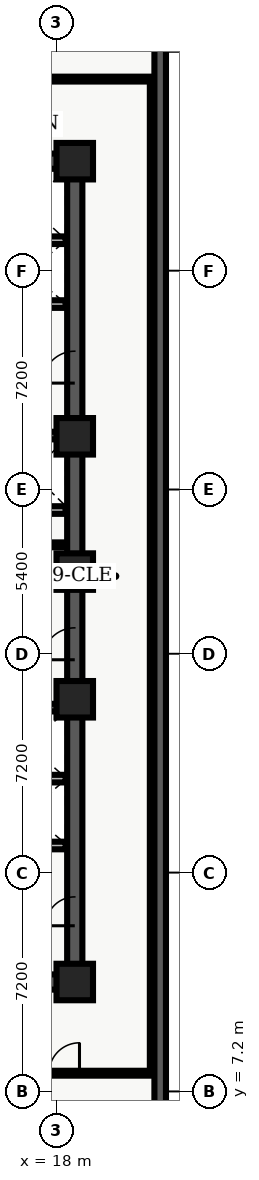
"""IFC4 building model, lengths in metres.
Left out: names, types, materials, properties, quantities, classifications, styles, units other than length and angle.
Written with IfcOpenShell. Run it as: python <this file> out.ifc"""

import sys

from ifc_helpers import new_model, entity, si_unit, converted_unit, direction, frame, origin_with_axes, origin_2d_with_axis, place, context, subcontext, project, spatial, polyline, rectangle, outline, extrude, element, fill, save


model = new_model("IFC4")
c1 = context("Model", 3, precision=1e-05, world=origin_with_axes(), true_north=direction((0.0, 1.0)))
c2 = subcontext(c1, "Body", "Model", "MODEL_VIEW")
j1 = project(units=[si_unit("LENGTHUNIT", "METRE"), converted_unit("PLANEANGLEUNIT", "DEGREE", entity("IfcPlaneAngleMeasure", 0.017), si_unit("PLANEANGLEUNIT", "RADIAN"), dimensions=[0, 0, 0, 0, 0, 0, 0])], contexts=[c1])
p1 = place(None, origin_with_axes())
s1 = spatial("IfcSite", under=j1, at=p1, CompositionType="ELEMENT")
p2 = place(p1, origin_with_axes())
s2 = spatial("IfcBuilding", under=s1, at=p2, CompositionType="ELEMENT")
p3 = place(p2, frame((0.0, 0.0, 120.3), z_axis=(0.0, 0.0, 1.0), x_axis=(1.0, 0.0, 0.0)))
s3 = spatial("IfcBuildingStorey", under=s2, at=p3, CompositionType="ELEMENT", Elevation=120.3)
p4 = place(p3, frame((11.4, 10.8, 0.0), z_axis=(0.0, 0.0, 1.0), x_axis=(1.0, 0.0, 0.0)))
e1 = element("IfcWall", 1, at=p4, inside=s3, PredefinedType="SHEAR", context=c2, shape_type="SweptSolid", body=[
    extrude(outline(polyline([(0.0, -0.25), (7.2, -0.25), (7.2, 0.25), (0.0, 0.25), (0.0, -0.25)])), origin_with_axes(), (0.0, 0.0, 1.0), 3.6),
])
p5 = place(p4, frame((2.625, 0.0, 0.0), z_axis=(0.0, 0.0, 1.0), x_axis=(1.0, 0.0, 0.0)))
e2 = element("IfcOpeningElement", 2, at=p5, cuts=e1, PredefinedType="OPENING", context=c2, shape_type="SweptSolid", body=[
    extrude(rectangle(XDim=1.05, YDim=0.52, at=origin_2d_with_axis()), origin_with_axes(), (0.0, 0.0, 1.0), 2.15),
])
p6 = place(p3, frame((11.4, 37.8, 0.0), z_axis=(0.0, 0.0, 1.0), x_axis=(1.0, 0.0, 0.0)))
e3 = element("IfcWall", 3, at=p6, inside=s3, PredefinedType="SHEAR", context=c2, shape_type="SweptSolid", body=[
    extrude(outline(polyline([(0.0, -0.25), (7.2, -0.25), (7.2, 0.25), (0.0, 0.25), (0.0, -0.25)])), origin_with_axes(), (0.0, 0.0, 1.0), 3.6),
])
p7 = place(p6, frame((2.625, 0.0, 0.0), z_axis=(0.0, 0.0, 1.0), x_axis=(1.0, 0.0, 0.0)))
e4 = element("IfcOpeningElement", 4, at=p7, cuts=e3, PredefinedType="OPENING", context=c2, shape_type="SweptSolid", body=[
    extrude(rectangle(XDim=1.05, YDim=0.52, at=origin_2d_with_axis()), origin_with_axes(), (0.0, 0.0, 1.0), 2.15),
])
p8 = place(p3, frame((18.6, 10.8, 0.0), z_axis=(0.0, 0.0, 1.0), x_axis=(0.0, 1.0, 0.0)))
e5 = element("IfcWall", 5, at=p8, inside=s3, PredefinedType="SHEAR", context=c2, shape_type="SweptSolid", body=[
    extrude(outline(polyline([(0.0, -0.25), (13.5, -0.25), (13.5, 0.25), (0.0, 0.25), (0.0, -0.25)])), origin_with_axes(), (0.0, 0.0, 1.0), 3.6),
])
p9 = place(p8, frame((11.125, 0.0, 0.0), z_axis=(0.0, 0.0, 1.0), x_axis=(1.0, 0.0, 0.0)))
e6 = element("IfcOpeningElement", 6, at=p9, cuts=e5, PredefinedType="OPENING", context=c2, shape_type="SweptSolid", body=[
    extrude(rectangle(XDim=1.05, YDim=0.52, at=origin_2d_with_axis()), origin_with_axes(), (0.0, 0.0, 1.0), 2.15),
])
p10 = place(p8, frame((2.325, 0.0, 0.0), z_axis=(0.0, 0.0, 1.0), x_axis=(1.0, 0.0, 0.0)))
e7 = element("IfcOpeningElement", 7, at=p10, cuts=e5, PredefinedType="OPENING", context=c2, shape_type="SweptSolid", body=[
    extrude(rectangle(XDim=0.95, YDim=0.52, at=origin_2d_with_axis()), origin_with_axes(), (0.0, 0.0, 1.0), 2.15),
])
p11 = place(p3, frame((18.6, 24.3, 0.0), z_axis=(0.0, 0.0, 1.0), x_axis=(0.0, 1.0, 0.0)))
e8 = element("IfcWall", 8, at=p11, inside=s3, PredefinedType="SHEAR", context=c2, shape_type="SweptSolid", body=[
    extrude(outline(polyline([(0.0, -0.25), (13.5, -0.25), (13.5, 0.25), (0.0, 0.25), (0.0, -0.25)])), origin_with_axes(), (0.0, 0.0, 1.0), 3.6),
])
p12 = place(p11, frame((6.725, 0.0, 0.0), z_axis=(0.0, 0.0, 1.0), x_axis=(1.0, 0.0, 0.0)))
e9 = element("IfcOpeningElement", 9, at=p12, cuts=e8, PredefinedType="OPENING", context=c2, shape_type="SweptSolid", body=[
    extrude(rectangle(XDim=1.05, YDim=0.52, at=origin_2d_with_axis()), origin_with_axes(), (0.0, 0.0, 1.0), 2.15),
])
for number, where, z_axis, x_axis in (
    (10, (11.65, 19.825, 0.0), (0.0, 0.0, 1.0), (1.0, 0.0, 0.0)),
    (11, (11.65, 28.775, 0.0), (0.0, 0.0, 1.0), (1.0, 0.0, 0.0)),
):
    element("IfcWall", number, at=place(p3, frame(where, z_axis=z_axis, x_axis=x_axis)), inside=s3, PredefinedType="SHEAR", context=c2, shape_type="SweptSolid", body=[
        extrude(outline(polyline([(0.0, -0.125), (6.7, -0.125), (6.7, 0.125), (0.0, 0.125), (0.0, -0.125)])), origin_with_axes(), (0.0, 0.0, 1.0), 3.6),
    ])
p13 = place(p3, frame((11.7, 24.1, 0.0), z_axis=(0.0, 0.0, 1.0), x_axis=(1.0, 0.0, 0.0)))
e12 = element("IfcWall", 12, at=p13, inside=s3, PredefinedType="SOLIDWALL", context=c2, shape_type="SweptSolid", body=[
    extrude(outline(polyline([(0.0, -0.125), (6.6, -0.125), (6.6, 0.125), (0.0, 0.125), (0.0, -0.125)])), origin_with_axes(), (0.0, 0.0, 1.0), 2.64),
])
p14 = place(p13, frame((3.75, 0.0, 0.0), z_axis=(0.0, 0.0, 1.0), x_axis=(1.0, 0.0, 0.0)))
e13 = element("IfcOpeningElement", 13, at=p14, cuts=e12, PredefinedType="OPENING", context=c2, shape_type="SweptSolid", body=[
    extrude(rectangle(XDim=0.9, YDim=0.27, at=origin_2d_with_axis()), origin_with_axes(), (0.0, 0.0, 1.0), 2.15),
])
p15 = place(p3, frame((11.7, 26.325, 0.0), z_axis=(0.0, 0.0, 1.0), x_axis=(1.0, 0.0, 0.0)))
e14 = element("IfcWall", 14, at=p15, inside=s3, PredefinedType="SOLIDWALL", context=c2, shape_type="SweptSolid", body=[
    extrude(outline(polyline([(0.0, -0.125), (6.6, -0.125), (6.6, 0.125), (0.0, 0.125), (0.0, -0.125)])), origin_with_axes(), (0.0, 0.0, 1.0), 2.64),
])
p16 = place(p15, frame((3.5, 0.0, 0.0), z_axis=(0.0, 0.0, 1.0), x_axis=(1.0, 0.0, 0.0)))
e15 = element("IfcOpeningElement", 15, at=p16, cuts=e14, PredefinedType="OPENING", context=c2, shape_type="SweptSolid", body=[
    extrude(rectangle(XDim=0.9, YDim=0.27, at=origin_2d_with_axis()), origin_with_axes(), (0.0, 0.0, 1.0), 2.15),
])
for number, where, z_axis, x_axis in (
    (16, (18.6, 10.8, 0.0), (0.0, 0.0, 1.0), (1.0, 0.0, 0.0)),
    (17, (18.6, 20.1, 0.0), (0.0, 0.0, 1.0), (1.0, 0.0, 0.0)),
    (18, (18.6, 24.3, 0.0), (0.0, 0.0, 1.0), (1.0, 0.0, 0.0)),
    (19, (18.6, 28.75, 0.0), (0.0, 0.0, 1.0), (1.0, 0.0, 0.0)),
    (20, (18.6, 37.8, 0.0), (0.0, 0.0, 1.0), (1.0, 0.0, 0.0)),
):
    element("IfcColumn", number, at=place(p3, frame(where, z_axis=z_axis, x_axis=x_axis)), inside=s3, PredefinedType="COLUMN", context=c2, shape_type="SweptSolid", body=[
        extrude(rectangle(XDim=1.2, YDim=1.2, at=origin_2d_with_axis()), origin_with_axes(), (0.0, 0.0, 1.0), 3.9),
    ])
p17 = place(p3, frame((14.62, 25.18, 0.0), z_axis=(0.0, 0.0, 1.0), x_axis=(1.0, 0.0, 0.0)))
e21 = element("IfcWall", 21, at=p17, inside=s3, PredefinedType="PARTITIONING", context=c2, shape_type="SweptSolid", body=[
    extrude(outline(polyline([(0.0, -0.08), (3.68, -0.08), (3.68, 0.08), (0.0, 0.08), (0.0, -0.08)])), origin_with_axes(), (0.0, 0.0, 1.0), 2.64),
])
p18 = place(p17, frame((1.95, 0.0, 0.0), z_axis=(0.0, 0.0, 1.0), x_axis=(1.0, 0.0, 0.0)))
e22 = element("IfcOpeningElement", 22, at=p18, cuts=e21, PredefinedType="OPENING", context=c2, shape_type="SweptSolid", body=[
    extrude(rectangle(XDim=0.9, YDim=0.18, at=origin_2d_with_axis()), origin_with_axes(), (0.0, 0.0, 1.0), 2.15),
])
for number, where, z_axis, x_axis in (
    (23, (15.84, 15.29, 0.0), (0.0, 0.0, 1.0), (1.0, 0.0, 0.0)),
    (24, (15.84, 17.49, 0.0), (0.0, 0.0, 1.0), (1.0, 0.0, 0.0)),
    (25, (15.84, 33.1, 0.0), (0.0, 0.0, 1.0), (1.0, 0.0, 0.0)),
    (26, (15.84, 35.2, 0.0), (0.0, 0.0, 1.0), (1.0, 0.0, 0.0)),
):
    element("IfcWall", number, at=place(p3, frame(where, z_axis=z_axis, x_axis=x_axis)), inside=s3, PredefinedType="SOLIDWALL", context=c2, shape_type="SweptSolid", body=[
        extrude(outline(polyline([(0.0, -0.125), (2.46, -0.125), (2.46, 0.125), (0.0, 0.125), (0.0, -0.125)])), origin_with_axes(), (0.0, 0.0, 1.0), 2.64),
    ])
p19 = place(p3, frame((2.6, 7.8, 0.0), z_axis=(0.0, 0.0, 1.0), x_axis=(1.0, 0.0, 0.0)))
e27 = element("IfcWall", 27, at=p19, inside=s3, PredefinedType="PARTITIONING", context=c2, shape_type="SweptSolid", body=[
    extrude(outline(polyline([(0.0, -0.08), (18.625, -0.08), (18.625, 0.08), (0.0, 0.08), (0.0, -0.08)])), origin_with_axes(), (0.0, 0.0, 1.0), 2.64),
])
p20 = place(p19, frame((1.86, 0.0, 0.0), z_axis=(0.0, 0.0, 1.0), x_axis=(1.0, 0.0, 0.0)))
e28 = element("IfcOpeningElement", 28, at=p20, cuts=e27, PredefinedType="OPENING", context=c2, shape_type="SweptSolid", body=[
    extrude(rectangle(XDim=1.0, YDim=0.18, at=origin_2d_with_axis()), origin_with_axes(), (0.0, 0.0, 1.0), 2.15),
])
p21 = place(p19, frame((6.825, 0.0, 0.0), z_axis=(0.0, 0.0, 1.0), x_axis=(1.0, 0.0, 0.0)))
e29 = element("IfcOpeningElement", 29, at=p21, cuts=e27, PredefinedType="OPENING", context=c2, shape_type="SweptSolid", body=[
    extrude(rectangle(XDim=1.0, YDim=0.18, at=origin_2d_with_axis()), origin_with_axes(), (0.0, 0.0, 1.0), 2.15),
])
p22 = place(p19, frame((10.806, 0.0, 0.0), z_axis=(0.0, 0.0, 1.0), x_axis=(1.0, 0.0, 0.0)))
e30 = element("IfcOpeningElement", 30, at=p22, cuts=e27, PredefinedType="OPENING", context=c2, shape_type="SweptSolid", body=[
    extrude(rectangle(XDim=1.0, YDim=0.18, at=origin_2d_with_axis()), origin_with_axes(), (0.0, 0.0, 1.0), 2.15),
])
p23 = place(p19, frame((15.655, 0.0, 0.0), z_axis=(0.0, 0.0, 1.0), x_axis=(1.0, 0.0, 0.0)))
e31 = element("IfcOpeningElement", 31, at=p23, cuts=e27, PredefinedType="OPENING", context=c2, shape_type="SweptSolid", body=[
    extrude(rectangle(XDim=1.0, YDim=0.18, at=origin_2d_with_axis()), origin_with_axes(), (0.0, 0.0, 1.0), 2.15),
])
p24 = place(p3, frame((2.6, 40.5, 0.0), z_axis=(0.0, 0.0, 1.0), x_axis=(1.0, 0.0, 0.0)))
e32 = element("IfcWall", 32, at=p24, inside=s3, PredefinedType="PARTITIONING", context=c2, shape_type="SweptSolid", body=[
    extrude(outline(polyline([(0.0, -0.08), (18.65, -0.08), (18.65, 0.08), (0.0, 0.08), (0.0, -0.08)])), origin_with_axes(), (0.0, 0.0, 1.0), 2.64),
])
p25 = place(p24, frame((8.205, 0.0, 0.0), z_axis=(0.0, 0.0, 1.0), x_axis=(1.0, 0.0, 0.0)))
e33 = element("IfcOpeningElement", 33, at=p25, cuts=e32, PredefinedType="OPENING", context=c2, shape_type="SweptSolid", body=[
    extrude(rectangle(XDim=1.0, YDim=0.18, at=origin_2d_with_axis()), origin_with_axes(), (0.0, 0.0, 1.0), 2.15),
])
p26 = place(p3, frame((21.15, 7.8, 0.0), z_axis=(0.0, 0.0, 1.0), x_axis=(0.0, 1.0, 0.0)))
e34 = element("IfcWall", 34, at=p26, inside=s3, PredefinedType="PARTITIONING", context=c2, shape_type="SweptSolid", body=[
    extrude(outline(polyline([(0.0, -0.08), (32.7, -0.08), (32.7, 0.08), (0.0, 0.08), (0.0, -0.08)])), origin_with_axes(), (0.0, 0.0, 1.0), 2.64),
])
p27 = place(p3, frame((21.41, 45.82, 0.0), z_axis=(0.0, 0.0, 1.0), x_axis=(0.0, -1.0, 0.0)))
e35 = element("IfcWall", 35, at=p27, inside=s3, PredefinedType="SOLIDWALL", context=c2, shape_type="SweptSolid", body=[
    extrude(outline(polyline([(0.0, -0.19), (45.82, -0.19), (45.82, 0.19), (0.0, 0.19), (0.0, -0.19)])), origin_with_axes(), (0.0, 0.0, 1.0), 3.6),
])
p28 = place(p27, frame((3.079, 0.0, 0.45), z_axis=(0.0, 0.0, 1.0), x_axis=(1.0, 0.0, 0.0)))
e36 = element("IfcOpeningElement", 36, at=p28, cuts=e35, PredefinedType="OPENING", context=c2, shape_type="SweptSolid", body=[
    extrude(rectangle(XDim=2.1, YDim=0.4, at=origin_2d_with_axis()), origin_with_axes(), (0.0, 0.0, 1.0), 2.2),
])
p29 = place(p8, frame((11.125, 0.0, 0.0), z_axis=(0.0, 0.0, 1.0), x_axis=(1.0, 0.0, 0.0)))
e37 = element("IfcDoor", 37, at=p29, inside=s3, OperationType="SINGLE_SWING_LEFT", PredefinedType="DOOR", context=c2, shape_type="SweptSolid", body=[
    extrude(rectangle(XDim=1.05, YDim=0.09, at=origin_2d_with_axis()), origin_with_axes(), (0.0, 0.0, 1.0), 2.15),
])
fill(e6, e37)
p30 = place(p8, frame((2.325, 0.0, 0.0), z_axis=(0.0, 0.0, 1.0), x_axis=(1.0, 0.0, 0.0)))
e38 = element("IfcDoor", 38, at=p30, inside=s3, OperationType="SINGLE_SWING_LEFT", PredefinedType="DOOR", context=c2, shape_type="SweptSolid", body=[
    extrude(rectangle(XDim=0.95, YDim=0.09, at=origin_2d_with_axis()), origin_with_axes(), (0.0, 0.0, 1.0), 2.15),
])
fill(e7, e38)
p31 = place(p11, frame((6.725, 0.0, 0.0), z_axis=(0.0, 0.0, 1.0), x_axis=(1.0, 0.0, 0.0)))
e39 = element("IfcDoor", 39, at=p31, inside=s3, OperationType="SINGLE_SWING_LEFT", PredefinedType="DOOR", context=c2, shape_type="SweptSolid", body=[
    extrude(rectangle(XDim=1.05, YDim=0.09, at=origin_2d_with_axis()), origin_with_axes(), (0.0, 0.0, 1.0), 2.15),
])
fill(e9, e39)
p32 = place(p19, frame((15.655, 0.0, 0.0), z_axis=(0.0, 0.0, 1.0), x_axis=(1.0, 0.0, 0.0)))
e40 = element("IfcDoor", 40, at=p32, inside=s3, OperationType="SINGLE_SWING_RIGHT", PredefinedType="DOOR", context=c2, shape_type="SweptSolid", body=[
    extrude(rectangle(XDim=1.0, YDim=0.09, at=origin_2d_with_axis()), origin_with_axes(), (0.0, 0.0, 1.0), 2.15),
])
fill(e31, e40)
save(model, sys.argv[1])
